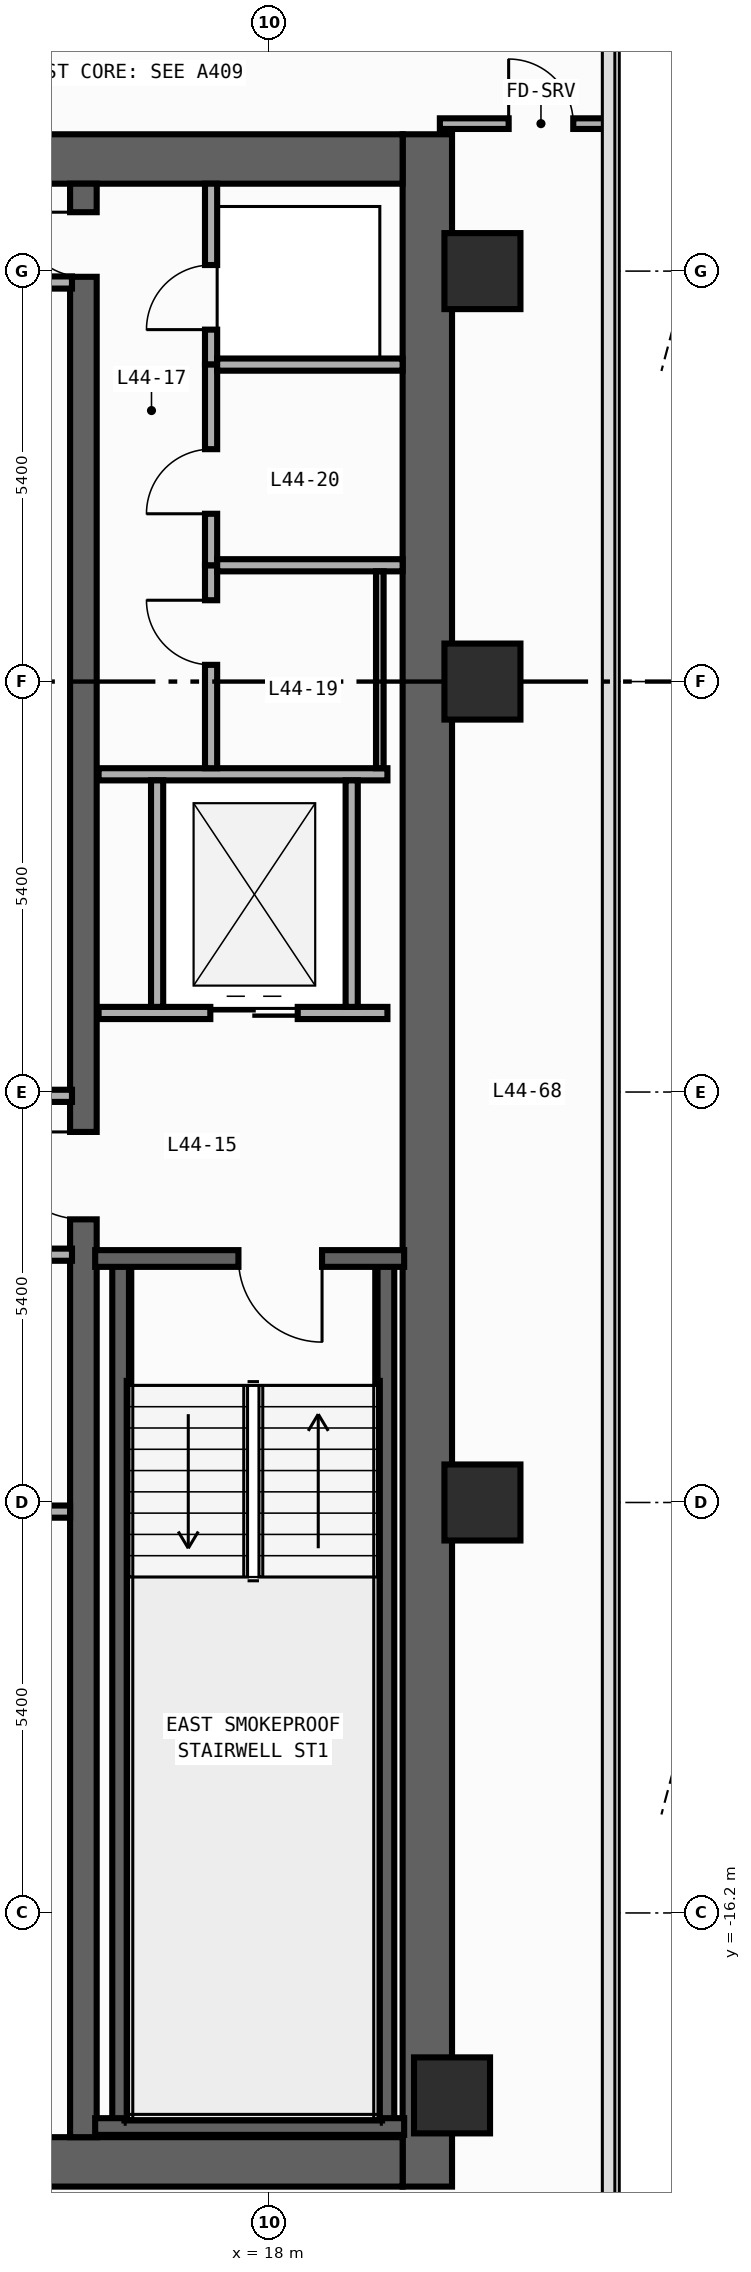
"""IFC4 building model, lengths in metres.
Left out: names, types, materials, properties, quantities, classifications, styles, units other than length and angle.
Written with IfcOpenShell. Run it as: python <this file> out.ifc"""

import sys

from ifc_helpers import new_model, si_unit, direction, frame, frame_2d, origin, origin_2d, place, context, subcontext, project, spatial, rectangle, extrude, element, fill, save


model = new_model("IFC4")
c1 = context("Model", 3, precision=1e-05, world=origin(), true_north=direction((0.0, 1.0)))
c2 = subcontext(c1, "Body", "Model", "MODEL_VIEW")
j1 = project(units=[si_unit("LENGTHUNIT", "METRE"), si_unit("PLANEANGLEUNIT", "RADIAN")], contexts=[c1])
p1 = place(None, origin())
s1 = spatial("IfcSite", under=j1, at=p1, CompositionType="ELEMENT")
p2 = place(p1, origin())
s2 = spatial("IfcBuilding", under=s1, at=p2, CompositionType="ELEMENT")
p3 = place(p2, frame((0.0, 0.0, 191.6)))
s3 = spatial("IfcBuildingStorey", under=s2, at=p3, CompositionType="ELEMENT", Elevation=191.6)
p4 = place(p3, frame((20.075, -19.8, 0.0), z_axis=(0.0, 0.0, 1.0), x_axis=(0.0, 1.0, 0.0)))
e1 = element("IfcWall", 1, at=p4, inside=s3, PredefinedType="SHEAR", context=c2, shape_type="SweptSolid", body=[
    extrude(rectangle(XDim=27.0, YDim=0.65, at=frame_2d((13.5, 0.0))), origin(), (0.0, 0.0, 1.0), 3.54),
])
for number, where, z_axis, x_axis in (
    (2, (12.65, -19.475, 0.0), (0.0, 0.0, 1.0), (1.0, 0.0, 0.0)),
    (3, (12.65, 6.875, 0.0), (0.0, 0.0, 1.0), (1.0, 0.0, 0.0)),
):
    element("IfcWall", number, at=place(p3, frame(where, z_axis=z_axis, x_axis=x_axis)), inside=s3, PredefinedType="SHEAR", context=c2, shape_type="SweptSolid", body=[
        extrude(rectangle(XDim=7.1, YDim=0.65, at=frame_2d((3.55, 0.0))), origin(), (0.0, 0.0, 1.0), 3.54),
    ])
p5 = place(p3, frame((15.55, -19.15, 0.0), z_axis=(0.0, 0.0, 1.0), x_axis=(0.0, 1.0, 0.0)))
e4 = element("IfcWall", 4, at=p5, inside=s3, PredefinedType="SHEAR", context=c2, shape_type="SweptSolid", body=[
    extrude(rectangle(XDim=25.7, YDim=0.35, at=frame_2d((12.85, 0.0))), origin(), (0.0, 0.0, 1.0), 3.54),
])
p6 = place(p5, frame((12.075, 0.0, 0.0)))
e5 = element("IfcOpeningElement", 5, at=p6, cuts=e4, PredefinedType="OPENING", context=c2, shape_type="SweptSolid", body=[
    extrude(rectangle(XDim=1.15, YDim=2.2, at=frame_2d((0.575, 1.1))), frame((0.0, 0.185, 0.0), z_axis=(0.0, -1.0, 0.0), x_axis=(1.0, 0.0, 0.0)), (0.0, 0.0, 1.0), 0.37),
])
p7 = place(p5, frame((24.475, 0.0, 0.0)))
e6 = element("IfcOpeningElement", 6, at=p7, cuts=e4, PredefinedType="OPENING", context=c2, shape_type="SweptSolid", body=[
    extrude(rectangle(XDim=0.85, YDim=2.1, at=frame_2d((0.425, 1.05))), frame((0.0, 0.185, 0.0), z_axis=(0.0, -1.0, 0.0), x_axis=(1.0, 0.0, 0.0)), (0.0, 0.0, 1.0), 0.37),
])
for number, where, z_axis, x_axis in (
    (7, (16.04, -19.01, 0.0), (0.0, 0.0, 1.0), (0.0, 1.0, 0.0)),
    (8, (19.53, -19.01, 0.0), (0.0, 0.0, 1.0), (0.0, 1.0, 0.0)),
):
    element("IfcWall", number, at=place(p3, frame(where, z_axis=z_axis, x_axis=x_axis)), inside=s3, PredefinedType="SHEAR", context=c2, shape_type="SweptSolid", body=[
        extrude(rectangle(XDim=11.42, YDim=0.22, at=frame_2d((5.71, 0.0))), origin(), (0.0, 0.0, 1.0), 3.54),
    ])
p8 = place(p3, frame((15.705, -19.01, 0.0), z_axis=(0.0, 0.0, 1.0), x_axis=(1.0, 0.0, 0.0)))
e9 = element("IfcWall", 9, at=p8, inside=s3, PredefinedType="SHEAR", context=c2, shape_type="SweptSolid", body=[
    extrude(rectangle(XDim=4.065, YDim=0.22, at=frame_2d((2.032, 0.0))), origin(), (0.0, 0.0, 1.0), 3.54),
])
p9 = place(p3, frame((19.77, -7.59, 0.0), z_axis=(0.0, 0.0, 1.0), x_axis=(-1.0, 0.0, 0.0)))
e10 = element("IfcWall", 10, at=p9, inside=s3, PredefinedType="SHEAR", context=c2, shape_type="SweptSolid", body=[
    extrude(rectangle(XDim=4.065, YDim=0.22, at=frame_2d((2.032, 0.0))), origin(), (0.0, 0.0, 1.0), 3.54),
])
p10 = place(p9, frame((1.08, 0.0, 0.0)))
e11 = element("IfcOpeningElement", 11, at=p10, cuts=e10, PredefinedType="OPENING", context=c2, shape_type="SweptSolid", body=[
    extrude(rectangle(XDim=1.1, YDim=2.2, at=frame_2d((0.55, 1.1))), frame((0.0, 0.12, 0.0), z_axis=(0.0, -1.0, 0.0), x_axis=(1.0, 0.0, 0.0)), (0.0, 0.0, 1.0), 0.24),
])
for number, where, z_axis, x_axis in (
    (12, (20.4, -18.6, 0.0), (0.0, 0.0, 1.0), (1.0, 0.0, 0.0)),
    (13, (20.8, -10.8, 0.0), (0.0, 0.0, 1.0), (1.0, 0.0, 0.0)),
    (14, (20.8, 0.0, 0.0), (0.0, 0.0, 1.0), (1.0, 0.0, 0.0)),
    (15, (20.8, 5.4, 0.0), (0.0, 0.0, 1.0), (1.0, 0.0, 0.0)),
):
    element("IfcColumn", number, at=place(p3, frame(where, z_axis=z_axis, x_axis=x_axis)), inside=s3, PredefinedType="COLUMN", context=c2, shape_type="SweptSolid", body=[
        extrude(rectangle(XDim=1.0, YDim=1.0, at=origin_2d()), origin(), (0.0, 0.0, 1.0), 3.8),
    ])
p11 = place(p3, frame((15.75, -4.36, 0.0), z_axis=(0.0, 0.0, 1.0), x_axis=(1.0, 0.0, 0.0)))
e16 = element("IfcWall", 16, at=p11, inside=s3, PredefinedType="STANDARD", context=c2, shape_type="SweptSolid", body=[
    extrude(rectangle(XDim=3.8, YDim=0.16, at=frame_2d((1.9, 0.0))), origin(), (0.0, 0.0, 1.0), 3.54),
])
p12 = place(p11, frame((1.47, 0.0, 0.0)))
e17 = element("IfcOpeningElement", 17, at=p12, cuts=e16, PredefinedType="OPENING", context=c2, shape_type="SweptSolid", body=[
    extrude(rectangle(XDim=1.15, YDim=2.2, at=frame_2d((0.575, 1.1))), frame((0.0, 0.09, 0.0), z_axis=(0.0, -1.0, 0.0), x_axis=(1.0, 0.0, 0.0)), (0.0, 0.0, 1.0), 0.18),
])
p13 = place(p3, frame((15.75, -1.22, 0.0), z_axis=(0.0, 0.0, 1.0), x_axis=(1.0, 0.0, 0.0)))
e18 = element("IfcWall", 18, at=p13, inside=s3, PredefinedType="STANDARD", context=c2, shape_type="SweptSolid", body=[
    extrude(rectangle(XDim=3.8, YDim=0.16, at=frame_2d((1.9, 0.0))), origin(), (0.0, 0.0, 1.0), 3.54),
])
for number, where, z_axis, x_axis in (
    (19, (16.52, -4.28, 0.0), (0.0, 0.0, 1.0), (0.0, 1.0, 0.0)),
    (20, (19.08, -4.28, 0.0), (0.0, 0.0, 1.0), (0.0, 1.0, 0.0)),
):
    element("IfcWall", number, at=place(p3, frame(where, z_axis=z_axis, x_axis=x_axis)), inside=s3, PredefinedType="STANDARD", context=c2, shape_type="SweptSolid", body=[
        extrude(rectangle(XDim=2.98, YDim=0.16, at=frame_2d((1.49, 0.0))), origin(), (0.0, 0.0, 1.0), 3.54),
    ])
for number, where, z_axis, x_axis in (
    (21, (12.8, -5.45, 0.0), (0.0, 0.0, 1.0), (1.0, 0.0, 0.0)),
    (22, (12.8, -7.54, 0.0), (0.0, 0.0, 1.0), (1.0, 0.0, 0.0)),
    (23, (12.8, 5.25, 0.0), (0.0, 0.0, 1.0), (1.0, 0.0, 0.0)),
):
    element("IfcWall", number, at=place(p3, frame(where, z_axis=z_axis, x_axis=x_axis)), inside=s3, PredefinedType="STANDARD", context=c2, shape_type="SweptSolid", body=[
        extrude(rectangle(XDim=2.6, YDim=0.16, at=frame_2d((1.3, 0.0))), origin(), (0.0, 0.0, 1.0), 3.54),
    ])
p14 = place(p3, frame((17.23, 4.17, 0.0), z_axis=(0.0, 0.0, 1.0), x_axis=(0.0, 1.0, 0.0)))
e24 = element("IfcWall", 24, at=p14, inside=s3, PredefinedType="PARTITIONING", context=c2, shape_type="SweptSolid", body=[
    extrude(rectangle(XDim=2.38, YDim=0.16, at=frame_2d((1.19, 0.0))), origin(), (0.0, 0.0, 1.0), 3.54),
])
p15 = place(p14, frame((0.46, 0.0, 0.0)))
e25 = element("IfcOpeningElement", 25, at=p15, cuts=e24, PredefinedType="OPENING", context=c2, shape_type="SweptSolid", body=[
    extrude(rectangle(XDim=0.85, YDim=2.1, at=frame_2d((0.425, 1.05))), frame((0.0, 0.09, 0.0), z_axis=(0.0, -1.0, 0.0), x_axis=(1.0, 0.0, 0.0)), (0.0, 0.0, 1.0), 0.18),
])
p16 = place(p3, frame((17.23, -1.14, 0.0), z_axis=(0.0, 0.0, 1.0), x_axis=(0.0, 1.0, 0.0)))
e26 = element("IfcWall", 26, at=p16, inside=s3, PredefinedType="PARTITIONING", context=c2, shape_type="SweptSolid", body=[
    extrude(rectangle(XDim=2.67, YDim=0.16, at=frame_2d((1.335, 0.0))), origin(), (0.0, 0.0, 1.0), 3.54),
])
p17 = place(p16, frame((1.36, 0.0, 0.0)))
e27 = element("IfcOpeningElement", 27, at=p17, cuts=e26, PredefinedType="OPENING", context=c2, shape_type="SweptSolid", body=[
    extrude(rectangle(XDim=0.85, YDim=2.1, at=frame_2d((0.425, 1.05))), frame((0.0, 0.09, 0.0), z_axis=(0.0, -1.0, 0.0), x_axis=(1.0, 0.0, 0.0)), (0.0, 0.0, 1.0), 0.18),
])
p18 = place(p3, frame((17.23, 1.53, 0.0), z_axis=(0.0, 0.0, 1.0), x_axis=(0.0, 1.0, 0.0)))
e28 = element("IfcWall", 28, at=p18, inside=s3, PredefinedType="PARTITIONING", context=c2, shape_type="SweptSolid", body=[
    extrude(rectangle(XDim=2.64, YDim=0.16, at=frame_2d((1.32, 0.0))), origin(), (0.0, 0.0, 1.0), 3.54),
])
p19 = place(p18, frame((0.677, 0.0, 0.0)))
e29 = element("IfcOpeningElement", 29, at=p19, cuts=e28, PredefinedType="OPENING", context=c2, shape_type="SweptSolid", body=[
    extrude(rectangle(XDim=0.85, YDim=2.1, at=frame_2d((0.425, 1.05))), frame((0.0, 0.09, 0.0), z_axis=(0.0, -1.0, 0.0), x_axis=(1.0, 0.0, 0.0)), (0.0, 0.0, 1.0), 0.18),
])
for number, where, z_axis, x_axis in (
    (30, (17.31, 4.17, 0.0), (0.0, 0.0, 1.0), (1.0, 0.0, 0.0)),
    (31, (17.31, 1.53, 0.0), (0.0, 0.0, 1.0), (1.0, 0.0, 0.0)),
):
    element("IfcWall", number, at=place(p3, frame(where, z_axis=z_axis, x_axis=x_axis)), inside=s3, PredefinedType="PARTITIONING", context=c2, shape_type="SweptSolid", body=[
        extrude(rectangle(XDim=2.44, YDim=0.16, at=frame_2d((1.22, 0.0))), origin(), (0.0, 0.0, 1.0), 3.54),
    ])
p20 = place(p3, frame((12.31, -10.92, 0.0), z_axis=(0.0, 0.0, 1.0), x_axis=(1.0, 0.0, 0.0)))
e32 = element("IfcWall", 32, at=p20, inside=s3, PredefinedType="PARTITIONING", context=c2, shape_type="SweptSolid", body=[
    extrude(rectangle(XDim=3.065, YDim=0.16, at=frame_2d((1.532, 0.0))), origin(), (0.0, 0.0, 1.0), 2.952),
])
p21 = place(p3, frame((20.24, 7.34, 0.0), z_axis=(0.0, 0.0, 1.0), x_axis=(1.0, 0.0, 0.0)))
e33 = element("IfcWall", 33, at=p21, inside=s3, PredefinedType="PARTITIONING", context=c2, shape_type="SweptSolid", body=[
    extrude(rectangle(XDim=2.215, YDim=0.14, at=frame_2d((1.107, 0.0))), origin(), (0.0, 0.0, 1.0), 3.54),
])
p22 = place(p21, frame((0.905, 0.0, 0.0)))
e34 = element("IfcOpeningElement", 34, at=p22, cuts=e33, PredefinedType="OPENING", context=c2, shape_type="SweptSolid", body=[
    extrude(rectangle(XDim=0.85, YDim=2.1, at=frame_2d((0.425, 1.05))), frame((0.0, 0.08, 0.0), z_axis=(0.0, -1.0, 0.0), x_axis=(1.0, 0.0, 0.0)), (0.0, 0.0, 1.0), 0.16),
])
p23 = place(p3, frame((19.45, 1.45, 0.0), z_axis=(0.0, 0.0, 1.0), x_axis=(0.0, -1.0, 0.0)))
e35 = element("IfcWall", 35, at=p23, inside=s3, PredefinedType="PARTITIONING", context=c2, shape_type="SweptSolid", body=[
    extrude(rectangle(XDim=2.59, YDim=0.1, at=frame_2d((1.295, 0.0))), origin(), (0.0, 0.0, 1.0), 3.54),
])
p24 = place(p10, origin())
e36 = element("IfcDoor", 36, at=p24, inside=s3, OperationType="SINGLE_SWING_LEFT", PredefinedType="DOOR", context=c2, shape_type="SweptSolid", body=[
    extrude(rectangle(XDim=1.1, YDim=2.2, at=frame_2d((0.55, 1.1))), frame((0.0, 0.025, 0.0), z_axis=(0.0, -1.0, 0.0), x_axis=(1.0, 0.0, 0.0)), (0.0, 0.0, 1.0), 0.05),
])
fill(e11, e36)
p25 = place(p6, origin())
e37 = element("IfcDoor", 37, at=p25, inside=s3, OperationType="SINGLE_SWING_RIGHT", PredefinedType="DOOR", context=c2, shape_type="SweptSolid", body=[
    extrude(rectangle(XDim=1.15, YDim=2.2, at=frame_2d((0.575, 1.1))), frame((0.0, 0.025, 0.0), z_axis=(0.0, -1.0, 0.0), x_axis=(1.0, 0.0, 0.0)), (0.0, 0.0, 1.0), 0.05),
])
fill(e5, e37)
p26 = place(p7, origin())
e38 = element("IfcDoor", 38, at=p26, inside=s3, OperationType="SINGLE_SWING_RIGHT", PredefinedType="DOOR", context=c2, shape_type="SweptSolid", body=[
    extrude(rectangle(XDim=0.85, YDim=2.1, at=frame_2d((0.425, 1.05))), frame((0.0, 0.025, 0.0), z_axis=(0.0, -1.0, 0.0), x_axis=(1.0, 0.0, 0.0)), (0.0, 0.0, 1.0), 0.05),
])
fill(e6, e38)
p27 = place(p12, origin())
e39 = element("IfcDoor", 39, at=p27, inside=s3, OperationType="DOUBLE_DOOR_SLIDING", PredefinedType="DOOR", context=c2, shape_type="SweptSolid", body=[
    extrude(rectangle(XDim=1.15, YDim=2.2, at=frame_2d((0.575, 1.1))), frame((0.0, 0.025, 0.0), z_axis=(0.0, -1.0, 0.0), x_axis=(1.0, 0.0, 0.0)), (0.0, 0.0, 1.0), 0.05),
])
fill(e17, e39)
p28 = place(p15, origin())
e40 = element("IfcDoor", 40, at=p28, inside=s3, OperationType="SINGLE_SWING_LEFT", PredefinedType="DOOR", context=c2, shape_type="SweptSolid", body=[
    extrude(rectangle(XDim=0.85, YDim=2.1, at=frame_2d((0.425, 1.05))), frame((0.0, 0.025, 0.0), z_axis=(0.0, -1.0, 0.0), x_axis=(1.0, 0.0, 0.0)), (0.0, 0.0, 1.0), 0.05),
])
fill(e25, e40)
p29 = place(p17, origin())
e41 = element("IfcDoor", 41, at=p29, inside=s3, OperationType="SINGLE_SWING_RIGHT", PredefinedType="DOOR", context=c2, shape_type="SweptSolid", body=[
    extrude(rectangle(XDim=0.85, YDim=2.1, at=frame_2d((0.425, 1.05))), frame((0.0, 0.025, 0.0), z_axis=(0.0, -1.0, 0.0), x_axis=(1.0, 0.0, 0.0)), (0.0, 0.0, 1.0), 0.05),
])
fill(e27, e41)
p30 = place(p19, origin())
e42 = element("IfcDoor", 42, at=p30, inside=s3, OperationType="SINGLE_SWING_LEFT", PredefinedType="DOOR", context=c2, shape_type="SweptSolid", body=[
    extrude(rectangle(XDim=0.85, YDim=2.1, at=frame_2d((0.425, 1.05))), frame((0.0, 0.025, 0.0), z_axis=(0.0, -1.0, 0.0), x_axis=(1.0, 0.0, 0.0)), (0.0, 0.0, 1.0), 0.05),
])
fill(e29, e42)
p31 = place(p22, origin())
e43 = element("IfcDoor", 43, at=p31, inside=s3, OperationType="SINGLE_SWING_LEFT", PredefinedType="DOOR", context=c2, shape_type="SweptSolid", body=[
    extrude(rectangle(XDim=0.85, YDim=2.1, at=frame_2d((0.425, 1.05))), frame((0.0, 0.025, 0.0), z_axis=(0.0, -1.0, 0.0), x_axis=(1.0, 0.0, 0.0)), (0.0, 0.0, 1.0), 0.05),
])
fill(e34, e43)
save(model, sys.argv[1])
